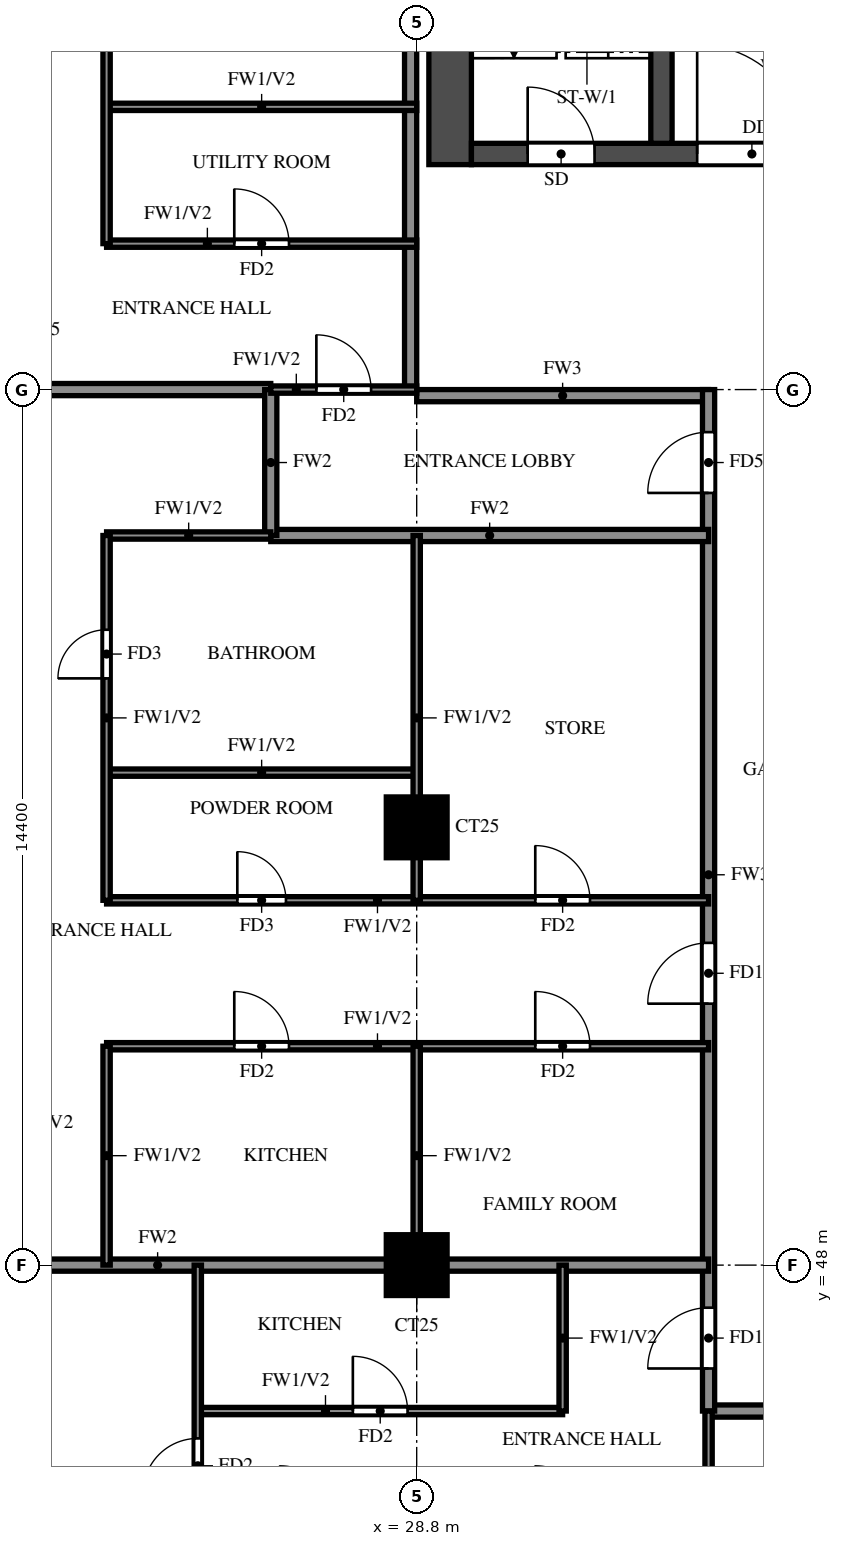
"""IFC4 building model, lengths in metres.
Left out: names, types, materials, properties, quantities, classifications, styles, units other than length and angle.
Written with IfcOpenShell. Run it as: python <this file> out.ifc"""

import sys

from ifc_helpers import new_model, si_unit, direction, frame, frame_2d, origin, origin_2d, place, context, subcontext, project, spatial, rectangle, extrude, source, transform, mapped, element, fill, save


model = new_model("IFC4")
c1 = context("Model", 3, precision=1e-05, world=origin(), true_north=direction((0.0, 1.0)))
c2 = subcontext(c1, "Body", "Model", "MODEL_VIEW")
j1 = project(units=[si_unit("LENGTHUNIT", "METRE"), si_unit("PLANEANGLEUNIT", "RADIAN")], contexts=[c1])
p1 = place(None, origin())
s1 = spatial("IfcSite", under=j1, at=p1, CompositionType="ELEMENT")
p2 = place(p1, origin())
s2 = spatial("IfcBuilding", under=s1, at=p2, CompositionType="ELEMENT")
p3 = place(p2, frame((0.0, 0.0, 150.0)))
s3 = spatial("IfcBuildingStorey", under=s2, at=p3, CompositionType="ELEMENT", Elevation=150.0)
m1 = source(origin(), c2, "Body", "SweptSolid", [
    extrude(rectangle(XDim=1.0, YDim=1.0, at=origin_2d()), origin(), (0.0, 0.0, 1.0), 3.2),
])
for number, where, z_axis, x_axis in (
    (1, (28.8, 48.0, 0.0), (0.0, 0.0, 1.0), (1.0, 0.0, 0.0)),
    (2, (28.8, 55.2, 0.0), (0.0, 0.0, 1.0), (1.0, 0.0, 0.0)),
):
    element("IfcColumn", number, at=place(p3, frame(where, z_axis=z_axis, x_axis=x_axis)), inside=s3, PredefinedType="COLUMN", context=c2, shape_type="MappedRepresentation", body=[
        mapped(m1, transform((0.0, 0.0, 0.0))),
    ])
p4 = place(p3, frame((29.35, 66.1, 0.0), z_axis=(0.0, 0.0, 1.0), x_axis=(0.0, 1.0, 0.0)))
e3 = element("IfcWall", 3, at=p4, inside=s3, PredefinedType="SHEAR", context=c2, shape_type="SweptSolid", body=[
    extrude(rectangle(XDim=11.9, YDim=0.7, at=frame_2d((5.95, 0.0))), origin(), (0.0, 0.0, 1.0), 3.2),
])
p5 = place(p3, frame((29.7, 66.275, 0.0), z_axis=(0.0, 0.0, 1.0), x_axis=(1.0, 0.0, 0.0)))
e4 = element("IfcWall", 4, at=p5, inside=s3, PredefinedType="SHEAR", context=c2, shape_type="SweptSolid", body=[
    extrude(rectangle(XDim=41.4, YDim=0.35, at=frame_2d((20.7, 0.0))), origin(), (0.0, 0.0, 1.0), 3.2),
])
p6 = place(p5, frame((0.925, 0.0, 0.0)))
e5 = element("IfcOpeningElement", 5, at=p6, cuts=e4, PredefinedType="OPENING", context=c2, shape_type="SweptSolid", body=[
    extrude(rectangle(XDim=1.1, YDim=2.1, at=frame_2d((0.55, 1.05))), frame((0.0, 0.185, 0.0), z_axis=(0.0, -1.0, 0.0), x_axis=(1.0, 0.0, 0.0)), (0.0, 0.0, 1.0), 0.37),
])
p7 = place(p5, frame((3.712, 0.0, 0.0)))
e6 = element("IfcOpeningElement", 6, at=p7, cuts=e4, PredefinedType="OPENING", context=c2, shape_type="SweptSolid", body=[
    extrude(rectangle(XDim=1.8, YDim=2.1, at=frame_2d((0.9, 1.05))), frame((0.0, 0.185, 0.0), z_axis=(0.0, -1.0, 0.0), x_axis=(1.0, 0.0, 0.0)), (0.0, 0.0, 1.0), 0.37),
])
p8 = place(p3, frame((32.825, 66.45, 0.0), z_axis=(0.0, 0.0, 1.0), x_axis=(0.0, 1.0, 0.0)))
e7 = element("IfcWall", 7, at=p8, inside=s3, PredefinedType="SHEAR", context=c2, shape_type="SweptSolid", body=[
    extrude(rectangle(XDim=10.85, YDim=0.35, at=frame_2d((5.425, 0.0))), origin(), (0.0, 0.0, 1.0), 3.2),
])
p9 = place(p3, frame((33.6, 45.6, 0.0), z_axis=(0.0, 0.0, 1.0), x_axis=(1.0, 0.0, 0.0)))
e8 = element("IfcWall", 8, at=p9, inside=s3, PredefinedType="SOLIDWALL", context=c2, shape_type="SweptSolid", body=[
    extrude(rectangle(XDim=7.2, YDim=0.2, at=frame_2d((3.6, 0.0))), origin(), (0.0, 0.0, 1.0), 3.2),
])
p10 = place(p9, frame((3.15, 0.0, 0.0)))
e9 = element("IfcOpeningElement", 9, at=p10, cuts=e8, PredefinedType="OPENING", context=c2, shape_type="SweptSolid", body=[
    extrude(rectangle(XDim=0.9, YDim=2.1, at=frame_2d((0.45, 1.05))), frame((0.0, 0.11, 0.0), z_axis=(0.0, -1.0, 0.0), x_axis=(1.0, 0.0, 0.0)), (0.0, 0.0, 1.0), 0.22),
])
p11 = place(p3, frame((28.8, 62.3, 0.0), z_axis=(0.0, 0.0, 1.0), x_axis=(1.0, 0.0, 0.0)))
e10 = element("IfcWall", 10, at=p11, inside=s3, PredefinedType="SOLIDWALL", context=c2, shape_type="SweptSolid", body=[
    extrude(rectangle(XDim=4.8, YDim=0.2, at=frame_2d((2.4, 0.0))), origin(), (0.0, 0.0, 1.0), 3.2),
])
p12 = place(p3, frame((28.7, 62.4, 0.0), z_axis=(0.0, 0.0, 1.0), x_axis=(0.0, 1.0, 0.0)))
e11 = element("IfcWall", 11, at=p12, inside=s3, PredefinedType="SOLIDWALL", context=c2, shape_type="SweptSolid", body=[
    extrude(rectangle(XDim=15.6, YDim=0.2, at=frame_2d((7.8, 0.0))), origin(), (0.0, 0.0, 1.0), 3.2),
])
p13 = place(p3, frame((33.6, 45.6, 0.0), z_axis=(0.0, 0.0, 1.0), x_axis=(0.0, 1.0, 0.0)))
e12 = element("IfcWall", 12, at=p13, inside=s3, PredefinedType="SOLIDWALL", context=c2, shape_type="SweptSolid", body=[
    extrude(rectangle(XDim=16.8, YDim=0.2, at=frame_2d((8.4, 0.0))), origin(), (0.0, 0.0, 1.0), 3.2),
])
p14 = place(p13, frame((0.7, 0.0, 0.0)))
e13 = element("IfcOpeningElement", 13, at=p14, cuts=e12, PredefinedType="OPENING", context=c2, shape_type="SweptSolid", body=[
    extrude(rectangle(XDim=1.0, YDim=2.1, at=frame_2d((0.5, 1.05))), frame((0.0, 0.11, 0.0), z_axis=(0.0, -1.0, 0.0), x_axis=(1.0, 0.0, 0.0)), (0.0, 0.0, 1.0), 0.22),
])
p15 = place(p13, frame((6.7, 0.0, 0.0)))
e14 = element("IfcOpeningElement", 14, at=p15, cuts=e12, PredefinedType="OPENING", context=c2, shape_type="SweptSolid", body=[
    extrude(rectangle(XDim=1.0, YDim=2.1, at=frame_2d((0.5, 1.05))), frame((0.0, 0.11, 0.0), z_axis=(0.0, -1.0, 0.0), x_axis=(1.0, 0.0, 0.0)), (0.0, 0.0, 1.0), 0.22),
])
p16 = place(p13, frame((15.1, 0.0, 0.0)))
e15 = element("IfcOpeningElement", 15, at=p16, cuts=e12, PredefinedType="OPENING", context=c2, shape_type="SweptSolid", body=[
    extrude(rectangle(XDim=1.0, YDim=2.1, at=frame_2d((0.5, 1.05))), frame((0.0, 0.11, 0.0), z_axis=(0.0, -1.0, 0.0), x_axis=(1.0, 0.0, 0.0)), (0.0, 0.0, 1.0), 0.22),
])
p17 = place(p3, frame((14.525, 48.0, 0.0), z_axis=(0.0, 0.0, 1.0), x_axis=(1.0, 0.0, 0.0)))
e16 = element("IfcWall", 16, at=p17, inside=s3, PredefinedType="SOLIDWALL", context=c2, shape_type="SweptSolid", body=[
    extrude(rectangle(XDim=19.075, YDim=0.2, at=frame_2d((9.538, 0.0))), origin(), (0.0, 0.0, 1.0), 3.2),
])
p18 = place(p3, frame((26.4, 60.0, 0.0), z_axis=(0.0, 0.0, 1.0), x_axis=(1.0, 0.0, 0.0)))
e17 = element("IfcWall", 17, at=p18, inside=s3, PredefinedType="SOLIDWALL", context=c2, shape_type="SweptSolid", body=[
    extrude(rectangle(XDim=7.2, YDim=0.2, at=frame_2d((3.6, 0.0))), origin(), (0.0, 0.0, 1.0), 3.2),
])
p19 = place(p3, frame((14.525, 62.4, 0.0), z_axis=(0.0, 0.0, 1.0), x_axis=(1.0, 0.0, 0.0)))
e18 = element("IfcWall", 18, at=p19, inside=s3, PredefinedType="SOLIDWALL", context=c2, shape_type="SweptSolid", body=[
    extrude(rectangle(XDim=11.875, YDim=0.2, at=frame_2d((5.938, 0.0))), origin(), (0.0, 0.0, 1.0), 3.2),
])
p20 = place(p3, frame((26.4, 60.0, 0.0), z_axis=(0.0, 0.0, 1.0), x_axis=(0.0, 1.0, 0.0)))
e19 = element("IfcWall", 19, at=p20, inside=s3, PredefinedType="SOLIDWALL", context=c2, shape_type="SweptSolid", body=[
    extrude(rectangle(XDim=2.4, YDim=0.2, at=frame_2d((1.2, 0.0))), origin(), (0.0, 0.0, 1.0), 3.2),
])
p21 = place(p3, frame((25.2, 45.6, 0.0), z_axis=(0.0, 0.0, 1.0), x_axis=(1.0, 0.0, 0.0)))
e20 = element("IfcWall", 20, at=p21, inside=s3, PredefinedType="PARTITIONING", context=c2, shape_type="SweptSolid", body=[
    extrude(rectangle(XDim=6.0, YDim=0.12, at=frame_2d((3.0, 0.0))), origin(), (0.0, 0.0, 1.0), 3.2),
])
p22 = place(p21, frame((2.55, 0.0, 0.0)))
e21 = element("IfcOpeningElement", 21, at=p22, cuts=e20, PredefinedType="OPENING", context=c2, shape_type="SweptSolid", body=[
    extrude(rectangle(XDim=0.9, YDim=2.1, at=frame_2d((0.45, 1.05))), frame((0.0, 0.07, 0.0), z_axis=(0.0, -1.0, 0.0), x_axis=(1.0, 0.0, 0.0)), (0.0, 0.0, 1.0), 0.14),
])
p23 = place(p3, frame((23.7, 51.6, 0.0), z_axis=(0.0, 0.0, 1.0), x_axis=(1.0, 0.0, 0.0)))
e22 = element("IfcWall", 22, at=p23, inside=s3, PredefinedType="PARTITIONING", context=c2, shape_type="SweptSolid", body=[
    extrude(rectangle(XDim=9.9, YDim=0.12, at=frame_2d((4.95, 0.0))), origin(), (0.0, 0.0, 1.0), 3.2),
])
p24 = place(p23, frame((2.1, 0.0, 0.0)))
e23 = element("IfcOpeningElement", 23, at=p24, cuts=e22, PredefinedType="OPENING", context=c2, shape_type="SweptSolid", body=[
    extrude(rectangle(XDim=0.9, YDim=2.1, at=frame_2d((0.45, 1.05))), frame((0.0, 0.07, 0.0), z_axis=(0.0, -1.0, 0.0), x_axis=(1.0, 0.0, 0.0)), (0.0, 0.0, 1.0), 0.14),
])
p25 = place(p23, frame((7.05, 0.0, 0.0)))
e24 = element("IfcOpeningElement", 24, at=p25, cuts=e22, PredefinedType="OPENING", context=c2, shape_type="SweptSolid", body=[
    extrude(rectangle(XDim=0.9, YDim=2.1, at=frame_2d((0.45, 1.05))), frame((0.0, 0.07, 0.0), z_axis=(0.0, -1.0, 0.0), x_axis=(1.0, 0.0, 0.0)), (0.0, 0.0, 1.0), 0.14),
])
p26 = place(p3, frame((23.7, 54.0, 0.0), z_axis=(0.0, 0.0, 1.0), x_axis=(1.0, 0.0, 0.0)))
e25 = element("IfcWall", 25, at=p26, inside=s3, PredefinedType="PARTITIONING", context=c2, shape_type="SweptSolid", body=[
    extrude(rectangle(XDim=9.9, YDim=0.12, at=frame_2d((4.95, 0.0))), origin(), (0.0, 0.0, 1.0), 3.2),
])
p27 = place(p26, frame((2.15, 0.0, 0.0)))
e26 = element("IfcOpeningElement", 26, at=p27, cuts=e25, PredefinedType="OPENING", context=c2, shape_type="SweptSolid", body=[
    extrude(rectangle(XDim=0.8, YDim=2.1, at=frame_2d((0.4, 1.05))), frame((0.0, 0.07, 0.0), z_axis=(0.0, -1.0, 0.0), x_axis=(1.0, 0.0, 0.0)), (0.0, 0.0, 1.0), 0.14),
])
p28 = place(p26, frame((7.05, 0.0, 0.0)))
e27 = element("IfcOpeningElement", 27, at=p28, cuts=e25, PredefinedType="OPENING", context=c2, shape_type="SweptSolid", body=[
    extrude(rectangle(XDim=0.9, YDim=2.1, at=frame_2d((0.45, 1.05))), frame((0.0, 0.07, 0.0), z_axis=(0.0, -1.0, 0.0), x_axis=(1.0, 0.0, 0.0)), (0.0, 0.0, 1.0), 0.14),
])
p29 = place(p3, frame((23.7, 56.1, 0.0), z_axis=(0.0, 0.0, 1.0), x_axis=(1.0, 0.0, 0.0)))
e28 = element("IfcWall", 28, at=p29, inside=s3, PredefinedType="PARTITIONING", context=c2, shape_type="SweptSolid", body=[
    extrude(rectangle(XDim=5.1, YDim=0.12, at=frame_2d((2.55, 0.0))), origin(), (0.0, 0.0, 1.0), 3.2),
])
p30 = place(p3, frame((23.7, 60.0, 0.0), z_axis=(0.0, 0.0, 1.0), x_axis=(1.0, 0.0, 0.0)))
e29 = element("IfcWall", 29, at=p30, inside=s3, PredefinedType="PARTITIONING", context=c2, shape_type="SweptSolid", body=[
    extrude(rectangle(XDim=2.7, YDim=0.12, at=frame_2d((1.35, 0.0))), origin(), (0.0, 0.0, 1.0), 3.2),
])
p31 = place(p3, frame((26.4, 62.4, 0.0), z_axis=(0.0, 0.0, 1.0), x_axis=(1.0, 0.0, 0.0)))
e30 = element("IfcWall", 30, at=p31, inside=s3, PredefinedType="PARTITIONING", context=c2, shape_type="SweptSolid", body=[
    extrude(rectangle(XDim=2.4, YDim=0.12, at=frame_2d((1.2, 0.0))), origin(), (0.0, 0.0, 1.0), 3.2),
])
p32 = place(p31, frame((0.75, 0.0, 0.0)))
e31 = element("IfcOpeningElement", 31, at=p32, cuts=e30, PredefinedType="OPENING", context=c2, shape_type="SweptSolid", body=[
    extrude(rectangle(XDim=0.9, YDim=2.1, at=frame_2d((0.45, 1.05))), frame((0.0, 0.07, 0.0), z_axis=(0.0, -1.0, 0.0), x_axis=(1.0, 0.0, 0.0)), (0.0, 0.0, 1.0), 0.14),
])
p33 = place(p3, frame((23.7, 64.8, 0.0), z_axis=(0.0, 0.0, 1.0), x_axis=(1.0, 0.0, 0.0)))
e32 = element("IfcWall", 32, at=p33, inside=s3, PredefinedType="PARTITIONING", context=c2, shape_type="SweptSolid", body=[
    extrude(rectangle(XDim=5.1, YDim=0.12, at=frame_2d((2.55, 0.0))), origin(), (0.0, 0.0, 1.0), 3.2),
])
p34 = place(p33, frame((2.1, 0.0, 0.0)))
e33 = element("IfcOpeningElement", 33, at=p34, cuts=e32, PredefinedType="OPENING", context=c2, shape_type="SweptSolid", body=[
    extrude(rectangle(XDim=0.9, YDim=2.1, at=frame_2d((0.45, 1.05))), frame((0.0, 0.07, 0.0), z_axis=(0.0, -1.0, 0.0), x_axis=(1.0, 0.0, 0.0)), (0.0, 0.0, 1.0), 0.14),
])
p35 = place(p3, frame((23.7, 67.05, 0.0), z_axis=(0.0, 0.0, 1.0), x_axis=(1.0, 0.0, 0.0)))
e34 = element("IfcWall", 34, at=p35, inside=s3, PredefinedType="PARTITIONING", context=c2, shape_type="SweptSolid", body=[
    extrude(rectangle(XDim=5.1, YDim=0.12, at=frame_2d((2.55, 0.0))), origin(), (0.0, 0.0, 1.0), 3.2),
])
p36 = place(p3, frame((23.7, 48.0, 0.0), z_axis=(0.0, 0.0, 1.0), x_axis=(0.0, 1.0, 0.0)))
e35 = element("IfcWall", 35, at=p36, inside=s3, PredefinedType="PARTITIONING", context=c2, shape_type="SweptSolid", body=[
    extrude(rectangle(XDim=3.6, YDim=0.12, at=frame_2d((1.8, 0.0))), origin(), (0.0, 0.0, 1.0), 3.2),
])
p37 = place(p3, frame((23.7, 54.0, 0.0), z_axis=(0.0, 0.0, 1.0), x_axis=(0.0, 1.0, 0.0)))
e36 = element("IfcWall", 36, at=p37, inside=s3, PredefinedType="PARTITIONING", context=c2, shape_type="SweptSolid", body=[
    extrude(rectangle(XDim=6.0, YDim=0.12, at=frame_2d((3.0, 0.0))), origin(), (0.0, 0.0, 1.0), 3.2),
])
p38 = place(p37, frame((3.65, 0.0, 0.0)))
e37 = element("IfcOpeningElement", 37, at=p38, cuts=e36, PredefinedType="OPENING", context=c2, shape_type="SweptSolid", body=[
    extrude(rectangle(XDim=0.8, YDim=2.1, at=frame_2d((0.4, 1.05))), frame((0.0, 0.07, 0.0), z_axis=(0.0, -1.0, 0.0), x_axis=(1.0, 0.0, 0.0)), (0.0, 0.0, 1.0), 0.14),
])
p39 = place(p3, frame((23.7, 64.8, 0.0), z_axis=(0.0, 0.0, 1.0), x_axis=(0.0, 1.0, 0.0)))
e38 = element("IfcWall", 38, at=p39, inside=s3, PredefinedType="PARTITIONING", context=c2, shape_type="SweptSolid", body=[
    extrude(rectangle(XDim=8.4, YDim=0.12, at=frame_2d((4.2, 0.0))), origin(), (0.0, 0.0, 1.0), 3.2),
])
p40 = place(p39, frame((4.875, 0.0, 0.0)))
e39 = element("IfcOpeningElement", 39, at=p40, cuts=e38, PredefinedType="OPENING", context=c2, shape_type="SweptSolid", body=[
    extrude(rectangle(XDim=0.9, YDim=2.1, at=frame_2d((0.45, 1.05))), frame((0.0, 0.07, 0.0), z_axis=(0.0, -1.0, 0.0), x_axis=(1.0, 0.0, 0.0)), (0.0, 0.0, 1.0), 0.14),
])
p41 = place(p3, frame((25.2, 39.725, 0.0), z_axis=(0.0, 0.0, 1.0), x_axis=(0.0, 1.0, 0.0)))
e40 = element("IfcWall", 40, at=p41, inside=s3, PredefinedType="PARTITIONING", context=c2, shape_type="SweptSolid", body=[
    extrude(rectangle(XDim=8.275, YDim=0.12, at=frame_2d((4.137, 0.0))), origin(), (0.0, 0.0, 1.0), 3.2),
])
p42 = place(p41, frame((4.525, 0.0, 0.0)))
e41 = element("IfcOpeningElement", 41, at=p42, cuts=e40, PredefinedType="OPENING", context=c2, shape_type="SweptSolid", body=[
    extrude(rectangle(XDim=0.9, YDim=2.1, at=frame_2d((0.45, 1.05))), frame((0.0, 0.07, 0.0), z_axis=(0.0, -1.0, 0.0), x_axis=(1.0, 0.0, 0.0)), (0.0, 0.0, 1.0), 0.14),
])
p43 = place(p3, frame((28.8, 48.0, 0.0), z_axis=(0.0, 0.0, 1.0), x_axis=(0.0, 1.0, 0.0)))
e42 = element("IfcWall", 42, at=p43, inside=s3, PredefinedType="PARTITIONING", context=c2, shape_type="SweptSolid", body=[
    extrude(rectangle(XDim=3.6, YDim=0.12, at=frame_2d((1.8, 0.0))), origin(), (0.0, 0.0, 1.0), 3.2),
])
p44 = place(p3, frame((28.8, 54.0, 0.0), z_axis=(0.0, 0.0, 1.0), x_axis=(0.0, 1.0, 0.0)))
e43 = element("IfcWall", 43, at=p44, inside=s3, PredefinedType="PARTITIONING", context=c2, shape_type="SweptSolid", body=[
    extrude(rectangle(XDim=6.0, YDim=0.12, at=frame_2d((3.0, 0.0))), origin(), (0.0, 0.0, 1.0), 3.2),
])
p45 = place(p3, frame((31.2, 45.6, 0.0), z_axis=(0.0, 0.0, 1.0), x_axis=(0.0, 1.0, 0.0)))
e44 = element("IfcWall", 44, at=p45, inside=s3, PredefinedType="PARTITIONING", context=c2, shape_type="SweptSolid", body=[
    extrude(rectangle(XDim=2.4, YDim=0.12, at=frame_2d((1.2, 0.0))), origin(), (0.0, 0.0, 1.0), 3.2),
])
p46 = place(p3, frame((33.6, 39.725, 0.0), z_axis=(0.0, 0.0, 1.0), x_axis=(0.0, 1.0, 0.0)))
e45 = element("IfcWall", 45, at=p46, inside=s3, PredefinedType="PARTITIONING", context=c2, shape_type="SweptSolid", body=[
    extrude(rectangle(XDim=5.875, YDim=0.12, at=frame_2d((2.938, 0.0))), origin(), (0.0, 0.0, 1.0), 3.2),
])
p47 = place(p6, origin())
e46 = element("IfcDoor", 46, at=p47, inside=s3, OperationType="SINGLE_SWING_LEFT", PredefinedType="DOOR", context=c2, shape_type="SweptSolid", body=[
    extrude(rectangle(XDim=1.1, YDim=2.1, at=frame_2d((0.55, 1.05))), frame((0.0, 0.025, 0.0), z_axis=(0.0, -1.0, 0.0), x_axis=(1.0, 0.0, 0.0)), (0.0, 0.0, 1.0), 0.05),
])
fill(e5, e46)
p48 = place(p7, origin())
e47 = element("IfcDoor", 47, at=p48, inside=s3, OperationType="DOUBLE_DOOR_SINGLE_SWING", PredefinedType="DOOR", context=c2, shape_type="SweptSolid", body=[
    extrude(rectangle(XDim=1.8, YDim=2.1, at=frame_2d((0.9, 1.05))), frame((0.0, 0.025, 0.0), z_axis=(0.0, -1.0, 0.0), x_axis=(1.0, 0.0, 0.0)), (0.0, 0.0, 1.0), 0.05),
])
fill(e6, e47)
p49 = place(p14, origin())
e48 = element("IfcDoor", 48, at=p49, inside=s3, OperationType="SINGLE_SWING_RIGHT", PredefinedType="DOOR", context=c2, shape_type="SweptSolid", body=[
    extrude(rectangle(XDim=1.0, YDim=2.1, at=frame_2d((0.5, 1.05))), frame((0.0, 0.025, 0.0), z_axis=(0.0, -1.0, 0.0), x_axis=(1.0, 0.0, 0.0)), (0.0, 0.0, 1.0), 0.05),
])
fill(e13, e48)
p50 = place(p42, origin())
e49 = element("IfcDoor", 49, at=p50, inside=s3, OperationType="SINGLE_SWING_LEFT", PredefinedType="DOOR", context=c2, shape_type="SweptSolid", body=[
    extrude(rectangle(XDim=0.9, YDim=2.1, at=frame_2d((0.45, 1.05))), frame((0.0, 0.025, 0.0), z_axis=(0.0, -1.0, 0.0), x_axis=(1.0, 0.0, 0.0)), (0.0, 0.0, 1.0), 0.05),
])
fill(e41, e49)
p51 = place(p22, origin())
e50 = element("IfcDoor", 50, at=p51, inside=s3, OperationType="SINGLE_SWING_LEFT", PredefinedType="DOOR", context=c2, shape_type="SweptSolid", body=[
    extrude(rectangle(XDim=0.9, YDim=2.1, at=frame_2d((0.45, 1.05))), frame((0.0, 0.025, 0.0), z_axis=(0.0, -1.0, 0.0), x_axis=(1.0, 0.0, 0.0)), (0.0, 0.0, 1.0), 0.05),
])
fill(e21, e50)
p52 = place(p15, origin())
e51 = element("IfcDoor", 51, at=p52, inside=s3, OperationType="SINGLE_SWING_RIGHT", PredefinedType="DOOR", context=c2, shape_type="SweptSolid", body=[
    extrude(rectangle(XDim=1.0, YDim=2.1, at=frame_2d((0.5, 1.05))), frame((0.0, 0.025, 0.0), z_axis=(0.0, -1.0, 0.0), x_axis=(1.0, 0.0, 0.0)), (0.0, 0.0, 1.0), 0.05),
])
fill(e14, e51)
p53 = place(p24, origin())
e52 = element("IfcDoor", 52, at=p53, inside=s3, OperationType="SINGLE_SWING_LEFT", PredefinedType="DOOR", context=c2, shape_type="SweptSolid", body=[
    extrude(rectangle(XDim=0.9, YDim=2.1, at=frame_2d((0.45, 1.05))), frame((0.0, 0.025, 0.0), z_axis=(0.0, -1.0, 0.0), x_axis=(1.0, 0.0, 0.0)), (0.0, 0.0, 1.0), 0.05),
])
fill(e23, e52)
p54 = place(p27, origin())
e53 = element("IfcDoor", 53, at=p54, inside=s3, OperationType="SINGLE_SWING_LEFT", PredefinedType="DOOR", context=c2, shape_type="SweptSolid", body=[
    extrude(rectangle(XDim=0.8, YDim=2.1, at=frame_2d((0.4, 1.05))), frame((0.0, 0.025, 0.0), z_axis=(0.0, -1.0, 0.0), x_axis=(1.0, 0.0, 0.0)), (0.0, 0.0, 1.0), 0.05),
])
fill(e26, e53)
p55 = place(p38, origin())
e54 = element("IfcDoor", 54, at=p55, inside=s3, OperationType="SINGLE_SWING_RIGHT", PredefinedType="DOOR", context=c2, shape_type="SweptSolid", body=[
    extrude(rectangle(XDim=0.8, YDim=2.1, at=frame_2d((0.4, 1.05))), frame((0.0, 0.025, 0.0), z_axis=(0.0, -1.0, 0.0), x_axis=(1.0, 0.0, 0.0)), (0.0, 0.0, 1.0), 0.05),
])
fill(e37, e54)
p56 = place(p25, origin())
e55 = element("IfcDoor", 55, at=p56, inside=s3, OperationType="SINGLE_SWING_LEFT", PredefinedType="DOOR", context=c2, shape_type="SweptSolid", body=[
    extrude(rectangle(XDim=0.9, YDim=2.1, at=frame_2d((0.45, 1.05))), frame((0.0, 0.025, 0.0), z_axis=(0.0, -1.0, 0.0), x_axis=(1.0, 0.0, 0.0)), (0.0, 0.0, 1.0), 0.05),
])
fill(e24, e55)
p57 = place(p28, origin())
e56 = element("IfcDoor", 56, at=p57, inside=s3, OperationType="SINGLE_SWING_LEFT", PredefinedType="DOOR", context=c2, shape_type="SweptSolid", body=[
    extrude(rectangle(XDim=0.9, YDim=2.1, at=frame_2d((0.45, 1.05))), frame((0.0, 0.025, 0.0), z_axis=(0.0, -1.0, 0.0), x_axis=(1.0, 0.0, 0.0)), (0.0, 0.0, 1.0), 0.05),
])
fill(e27, e56)
p58 = place(p32, origin())
e57 = element("IfcDoor", 57, at=p58, inside=s3, OperationType="SINGLE_SWING_RIGHT", PredefinedType="DOOR", context=c2, shape_type="SweptSolid", body=[
    extrude(rectangle(XDim=0.9, YDim=2.1, at=frame_2d((0.45, 1.05))), frame((0.0, 0.025, 0.0), z_axis=(0.0, -1.0, 0.0), x_axis=(1.0, 0.0, 0.0)), (0.0, 0.0, 1.0), 0.05),
])
fill(e31, e57)
p59 = place(p16, origin())
e58 = element("IfcDoor", 58, at=p59, inside=s3, OperationType="SINGLE_SWING_LEFT", PredefinedType="DOOR", context=c2, shape_type="SweptSolid", body=[
    extrude(rectangle(XDim=1.0, YDim=2.1, at=frame_2d((0.5, 1.05))), frame((0.0, 0.025, 0.0), z_axis=(0.0, -1.0, 0.0), x_axis=(1.0, 0.0, 0.0)), (0.0, 0.0, 1.0), 0.05),
])
fill(e15, e58)
p60 = place(p34, origin())
e59 = element("IfcDoor", 59, at=p60, inside=s3, OperationType="SINGLE_SWING_RIGHT", PredefinedType="DOOR", context=c2, shape_type="SweptSolid", body=[
    extrude(rectangle(XDim=0.9, YDim=2.1, at=frame_2d((0.45, 1.05))), frame((0.0, 0.025, 0.0), z_axis=(0.0, -1.0, 0.0), x_axis=(1.0, 0.0, 0.0)), (0.0, 0.0, 1.0), 0.05),
])
fill(e33, e59)
save(model, sys.argv[1])
